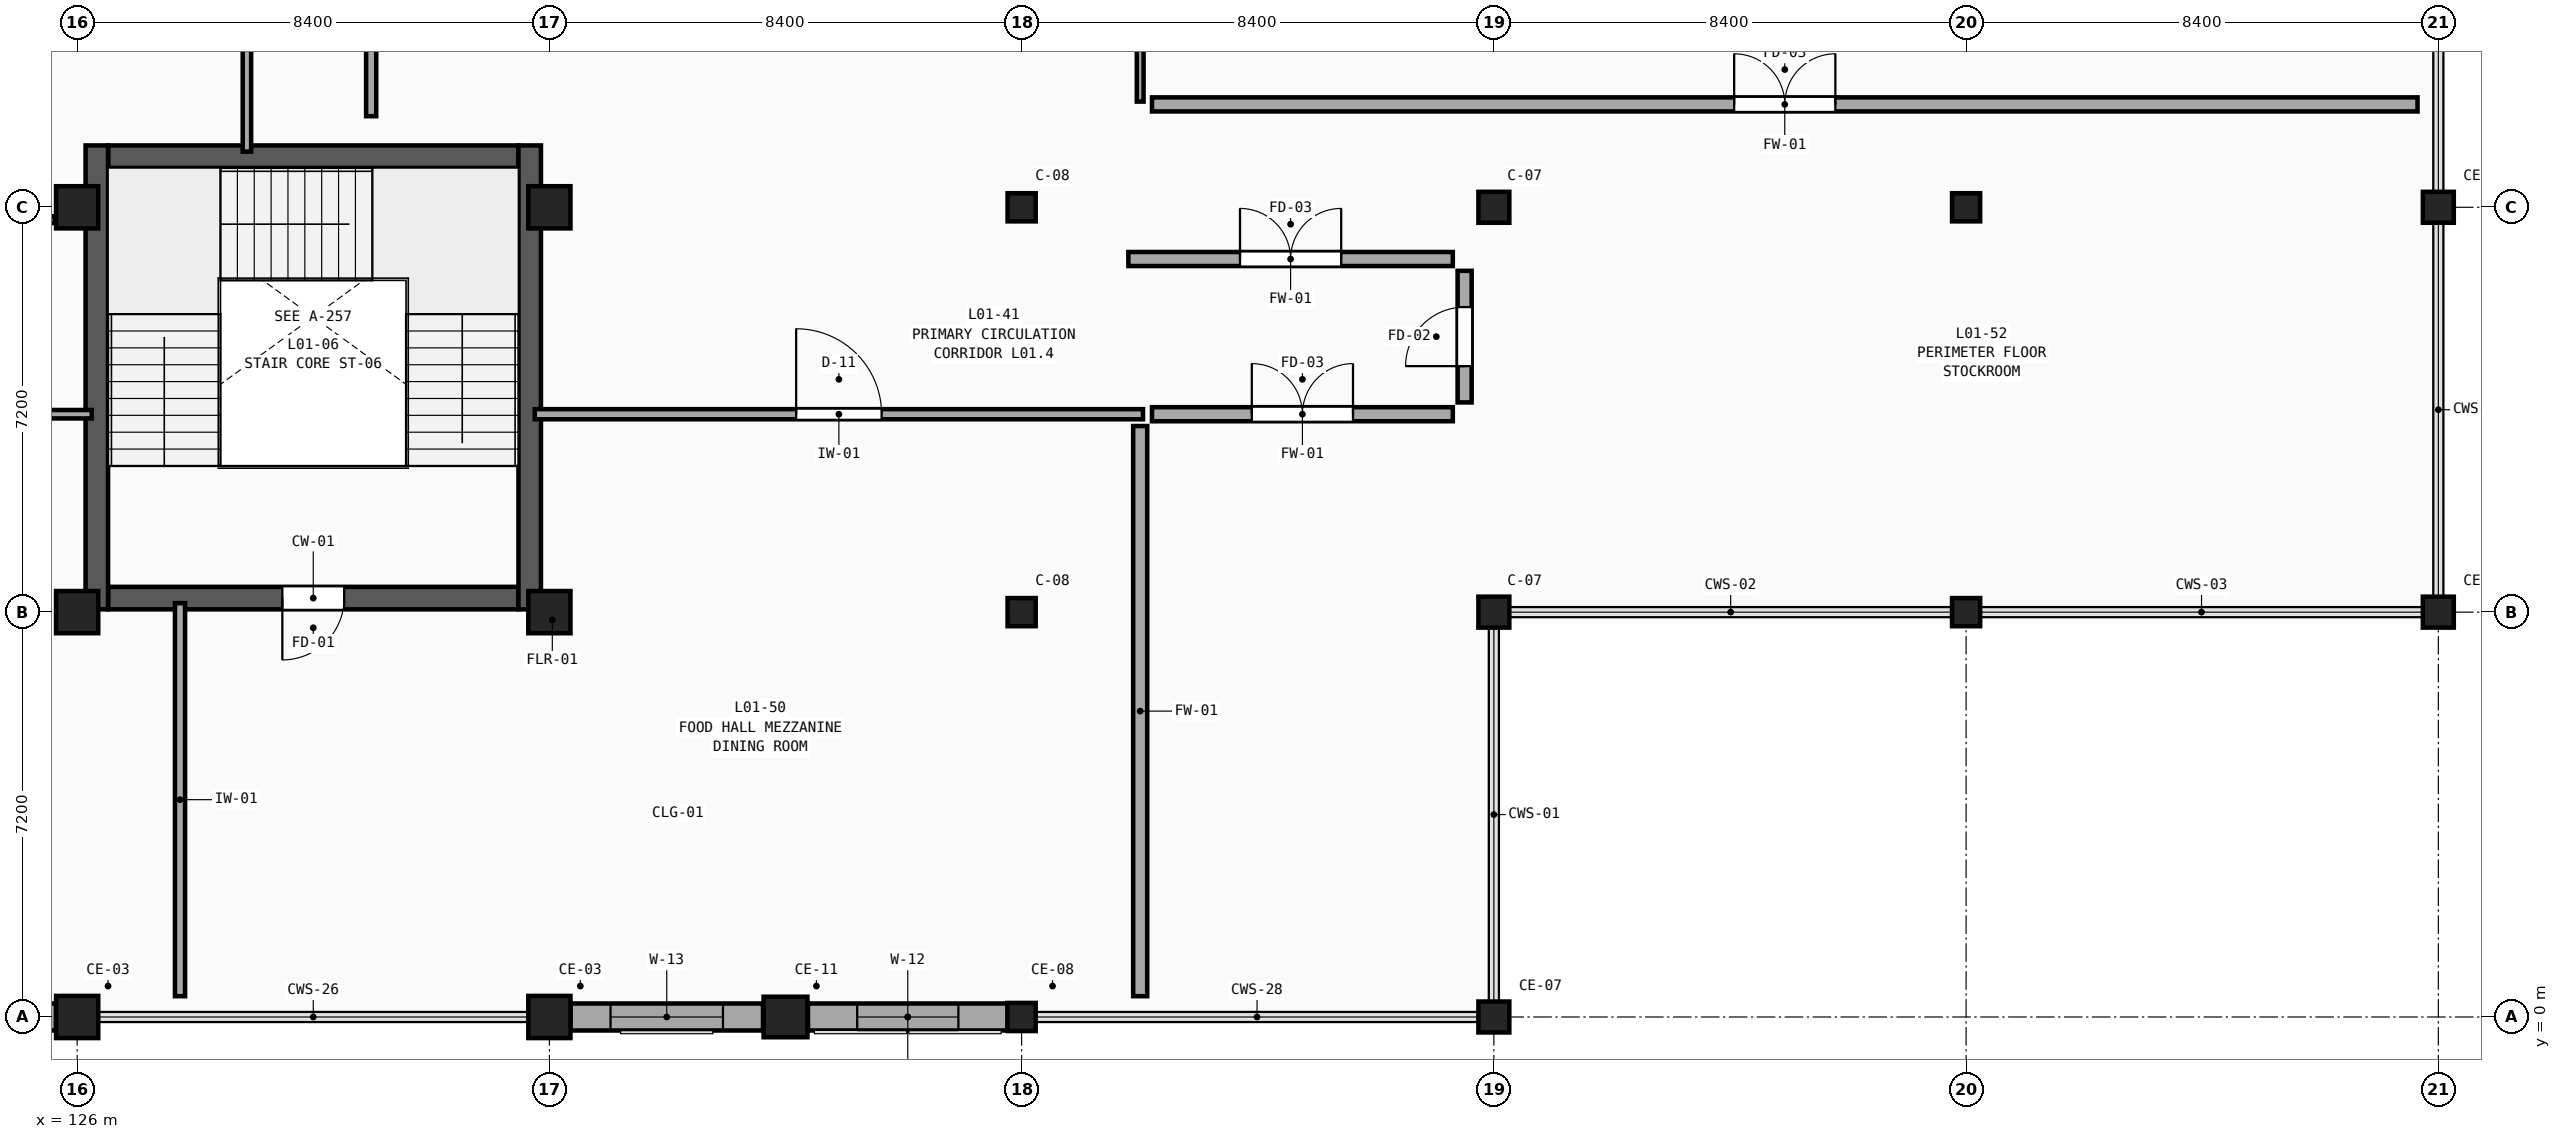
"""IFC4 building model, lengths in metres.
Left out: names, types, materials, properties, quantities, classifications, styles, units other than length and angle.
Written with IfcOpenShell. Run it as: python <this file> out.ifc"""

import sys

from ifc_helpers import new_model, si_unit, direction, frame, frame_2d, origin, origin_2d, place, context, subcontext, project, spatial, rectangle, extrude, element, fill, save


model = new_model("IFC4")
c1 = context("Model", 3, precision=1e-05, world=origin(), true_north=direction((0.0, 1.0)))
c2 = subcontext(c1, "Body", "Model", "MODEL_VIEW")
j1 = project(units=[si_unit("LENGTHUNIT", "METRE"), si_unit("PLANEANGLEUNIT", "RADIAN")], contexts=[c1])
p1 = place(None, origin())
s1 = spatial("IfcSite", under=j1, at=p1, CompositionType="ELEMENT")
p2 = place(p1, origin())
s2 = spatial("IfcBuilding", under=s1, at=p2, CompositionType="ELEMENT")
p3 = place(p2, frame((0.0, 0.0, 5.4)))
s3 = spatial("IfcBuildingStorey", under=s2, at=p3, CompositionType="ELEMENT", Elevation=5.4)
for number, where, z_axis, x_axis in (
    (1, (126.0, 0.0, 0.0), (0.0, 0.0, 1.0), (1.0, 0.0, 0.0)),
    (2, (126.0, 7.2, 0.0), (0.0, 0.0, 1.0), (1.0, 0.0, 0.0)),
    (3, (126.0, 14.4, 0.0), (0.0, 0.0, 1.0), (1.0, 0.0, 0.0)),
    (4, (134.4, 0.0, 0.0), (0.0, 0.0, 1.0), (1.0, 0.0, 0.0)),
    (5, (134.4, 7.2, 0.0), (0.0, 0.0, 1.0), (1.0, 0.0, 0.0)),
    (6, (134.4, 14.4, 0.0), (0.0, 0.0, 1.0), (1.0, 0.0, 0.0)),
):
    element("IfcColumn", number, at=place(p3, frame(where, z_axis=z_axis, x_axis=x_axis)), inside=s3, PredefinedType="COLUMN", context=c2, shape_type="SweptSolid", body=[
        extrude(rectangle(XDim=0.75, YDim=0.75, at=origin_2d()), origin(), (0.0, 0.0, 1.0), 4.5),
    ])
for number, where, z_axis, x_axis in (
    (7, (142.8, 0.0, 0.0), (0.0, 0.0, 1.0), (1.0, 0.0, 0.0)),
    (8, (142.8, 7.2, 0.0), (0.0, 0.0, 1.0), (1.0, 0.0, 0.0)),
    (9, (142.8, 14.4, 0.0), (0.0, 0.0, 1.0), (1.0, 0.0, 0.0)),
):
    element("IfcColumn", number, at=place(p3, frame(where, z_axis=z_axis, x_axis=x_axis)), inside=s3, PredefinedType="COLUMN", context=c2, shape_type="SweptSolid", body=[
        extrude(rectangle(XDim=0.5, YDim=0.5, at=origin_2d()), origin(), (0.0, 0.0, 1.0), 4.5),
    ])
for number, where, z_axis, x_axis in (
    (10, (151.2, 0.0, 0.0), (0.0, 0.0, 1.0), (1.0, 0.0, 0.0)),
    (11, (151.2, 7.2, 0.0), (0.0, 0.0, 1.0), (1.0, 0.0, 0.0)),
    (12, (151.2, 14.4, 0.0), (0.0, 0.0, 1.0), (1.0, 0.0, 0.0)),
):
    element("IfcColumn", number, at=place(p3, frame(where, z_axis=z_axis, x_axis=x_axis)), inside=s3, PredefinedType="COLUMN", context=c2, shape_type="SweptSolid", body=[
        extrude(rectangle(XDim=0.55, YDim=0.55, at=origin_2d()), origin(), (0.0, 0.0, 1.0), 4.5),
    ])
for number, where, z_axis, x_axis in (
    (13, (159.6, 7.2, 0.0), (0.0, 0.0, 1.0), (1.0, 0.0, 0.0)),
    (14, (159.6, 14.4, 0.0), (0.0, 0.0, 1.0), (1.0, 0.0, 0.0)),
):
    element("IfcColumn", number, at=place(p3, frame(where, z_axis=z_axis, x_axis=x_axis)), inside=s3, PredefinedType="COLUMN", context=c2, shape_type="SweptSolid", body=[
        extrude(rectangle(XDim=0.5, YDim=0.5, at=origin_2d()), origin(), (0.0, 0.0, 1.0), 4.5),
    ])
for number, where, z_axis, x_axis in (
    (15, (168.0, 7.2, 0.0), (0.0, 0.0, 1.0), (1.0, 0.0, 0.0)),
    (16, (168.0, 14.4, 0.0), (0.0, 0.0, 1.0), (1.0, 0.0, 0.0)),
):
    element("IfcColumn", number, at=place(p3, frame(where, z_axis=z_axis, x_axis=x_axis)), inside=s3, PredefinedType="COLUMN", context=c2, shape_type="SweptSolid", body=[
        extrude(rectangle(XDim=0.55, YDim=0.55, at=origin_2d()), origin(), (0.0, 0.0, 1.0), 4.5),
    ])
p4 = place(p3, frame((138.6, 0.0, 0.0), z_axis=(0.0, 0.0, 1.0), x_axis=(1.0, 0.0, 0.0)))
e17 = element("IfcColumn", 17, at=p4, inside=s3, PredefinedType="PILASTER", context=c2, shape_type="SweptSolid", body=[
    extrude(rectangle(XDim=0.78, YDim=0.72, at=origin_2d()), origin(), (0.0, 0.0, 1.0), 4.5),
])
p5 = place(p3, frame((125.625, 0.0, 0.0), z_axis=(0.0, 0.0, 1.0), x_axis=(-1.0, 0.0, 0.0)))
e18 = element("IfcWall", 18, at=p5, inside=s3, PredefinedType="SOLIDWALL", context=c2, shape_type="SweptSolid", body=[
    extrude(rectangle(XDim=3.425, YDim=0.48, at=frame_2d((1.712, 0.0))), origin(), (0.0, 0.0, 1.0), 3.63),
])
p6 = place(p5, frame((0.427, 0.0, 0.75)))
e19 = element("IfcOpeningElement", 19, at=p6, cuts=e18, PredefinedType="OPENING", context=c2, shape_type="SweptSolid", body=[
    extrude(rectangle(XDim=2.57, YDim=1.9, at=frame_2d((1.285, 0.95))), frame((0.0, 0.26, 0.0), z_axis=(0.0, -1.0, 0.0), x_axis=(1.0, 0.0, 0.0)), (0.0, 0.0, 1.0), 0.52),
])
p7 = place(p3, frame((142.55, 0.0, 0.0), z_axis=(0.0, 0.0, 1.0), x_axis=(-1.0, 0.0, 0.0)))
e20 = element("IfcWall", 20, at=p7, inside=s3, PredefinedType="SOLIDWALL", context=c2, shape_type="SweptSolid", body=[
    extrude(rectangle(XDim=3.55, YDim=0.48, at=frame_2d((1.775, 0.0))), origin(), (0.0, 0.0, 1.0), 3.63),
])
p8 = place(p7, frame((0.875, 0.0, 0.75)))
e21 = element("IfcOpeningElement", 21, at=p8, cuts=e20, PredefinedType="OPENING", context=c2, shape_type="SweptSolid", body=[
    extrude(rectangle(XDim=1.8, YDim=2.08, at=frame_2d((0.9, 1.04))), frame((0.0, 0.26, 0.0), z_axis=(0.0, -1.0, 0.0), x_axis=(1.0, 0.0, 0.0)), (0.0, 0.0, 1.0), 0.52),
])
p9 = place(p3, frame((138.2, 0.0, 0.0), z_axis=(0.0, 0.0, 1.0), x_axis=(-1.0, 0.0, 0.0)))
e22 = element("IfcWall", 22, at=p9, inside=s3, PredefinedType="SOLIDWALL", context=c2, shape_type="SweptSolid", body=[
    extrude(rectangle(XDim=3.425, YDim=0.48, at=frame_2d((1.712, 0.0))), origin(), (0.0, 0.0, 1.0), 3.63),
])
p10 = place(p9, frame((0.712, 0.0, 0.75)))
e23 = element("IfcOpeningElement", 23, at=p10, cuts=e22, PredefinedType="OPENING", context=c2, shape_type="SweptSolid", body=[
    extrude(rectangle(XDim=2.0, YDim=2.08, at=frame_2d((1.0, 1.04))), frame((0.0, 0.26, 0.0), z_axis=(0.0, -1.0, 0.0), x_axis=(1.0, 0.0, 0.0)), (0.0, 0.0, 1.0), 0.52),
])
p11 = place(p3, frame((133.85, 7.45, 0.0), z_axis=(0.0, 0.0, 1.0), x_axis=(-1.0, 0.0, 0.0)))
e24 = element("IfcWall", 24, at=p11, inside=s3, PredefinedType="SHEAR", context=c2, shape_type="SweptSolid", body=[
    extrude(rectangle(XDim=7.3, YDim=0.4, at=frame_2d((3.65, 0.0))), origin(), (0.0, 0.0, 1.0), 4.5),
])
p12 = place(p11, frame((3.1, 0.0, 0.0)))
e25 = element("IfcOpeningElement", 25, at=p12, cuts=e24, PredefinedType="OPENING", context=c2, shape_type="SweptSolid", body=[
    extrude(rectangle(XDim=1.1, YDim=2.2, at=frame_2d((0.55, 1.1))), frame((0.0, 0.22, 0.0), z_axis=(0.0, -1.0, 0.0), x_axis=(1.0, 0.0, 0.0)), (0.0, 0.0, 1.0), 0.44),
])
p13 = place(p3, frame((126.55, 15.3, 0.0), z_axis=(0.0, 0.0, 1.0), x_axis=(1.0, 0.0, 0.0)))
e26 = element("IfcWall", 26, at=p13, inside=s3, PredefinedType="SHEAR", context=c2, shape_type="SweptSolid", body=[
    extrude(rectangle(XDim=7.3, YDim=0.4, at=frame_2d((3.65, 0.0))), origin(), (0.0, 0.0, 1.0), 4.5),
])
for number, where, z_axis, x_axis in (
    (27, (126.35, 15.5, 0.0), (0.0, 0.0, 1.0), (0.0, -1.0, 0.0)),
    (28, (134.05, 7.25, 0.0), (0.0, 0.0, 1.0), (0.0, 1.0, 0.0)),
):
    element("IfcWall", number, at=place(p3, frame(where, z_axis=z_axis, x_axis=x_axis)), inside=s3, PredefinedType="SHEAR", context=c2, shape_type="SweptSolid", body=[
        extrude(rectangle(XDim=8.25, YDim=0.4, at=frame_2d((4.125, 0.0))), origin(), (0.0, 0.0, 1.0), 4.5),
    ])
p14 = place(p3, frame((108.74, 10.72, 0.0), z_axis=(0.0, 0.0, 1.0), x_axis=(1.0, 0.0, 0.0)))
e29 = element("IfcWall", 29, at=p14, inside=s3, PredefinedType="PARTITIONING", context=c2, shape_type="SweptSolid", body=[
    extrude(rectangle(XDim=17.52, YDim=0.15, at=frame_2d((8.76, 0.0))), origin(), (0.0, 0.0, 1.0), 4.18),
])
p15 = place(p14, frame((8.16, 0.0, 0.0)))
e30 = element("IfcOpeningElement", 30, at=p15, cuts=e29, PredefinedType="OPENING", context=c2, shape_type="SweptSolid", body=[
    extrude(rectangle(XDim=1.2, YDim=2.45, at=frame_2d((0.6, 1.225))), frame((0.0, 0.095, 0.0), z_axis=(0.0, -1.0, 0.0), x_axis=(1.0, 0.0, 0.0)), (0.0, 0.0, 1.0), 0.19),
])
p16 = place(p3, frame((117.995, 14.18, 0.0), z_axis=(0.0, 0.0, 1.0), x_axis=(1.0, 0.0, 0.0)))
e31 = element("IfcWall", 31, at=p16, inside=s3, PredefinedType="PARTITIONING", context=c2, shape_type="SweptSolid", body=[
    extrude(rectangle(XDim=7.61, YDim=0.12, at=frame_2d((3.805, 0.0))), origin(), (0.0, 0.0, 1.0), 3.73),
])
p17 = place(p16, frame((3.365, 0.0, 0.0)))
e32 = element("IfcOpeningElement", 32, at=p17, cuts=e31, PredefinedType="OPENING", context=c2, shape_type="SweptSolid", body=[
    extrude(rectangle(XDim=0.88, YDim=2.05, at=frame_2d((0.44, 1.025))), frame((0.0, 0.08, 0.0), z_axis=(0.0, -1.0, 0.0), x_axis=(1.0, 0.0, 0.0)), (0.0, 0.0, 1.0), 0.16),
])
p18 = place(p3, frame((134.14, 10.72, 0.0), z_axis=(0.0, 0.0, 1.0), x_axis=(1.0, 0.0, 0.0)))
e33 = element("IfcWall", 33, at=p18, inside=s3, PredefinedType="PARTITIONING", context=c2, shape_type="SweptSolid", body=[
    extrude(rectangle(XDim=10.819, YDim=0.18, at=frame_2d((5.41, 0.0))), origin(), (0.0, 0.0, 1.0), 4.18),
])
p19 = place(p18, frame((4.649, 0.0, 0.0)))
e34 = element("IfcOpeningElement", 34, at=p19, cuts=e33, PredefinedType="OPENING", context=c2, shape_type="SweptSolid", body=[
    extrude(rectangle(XDim=1.52, YDim=2.13, at=frame_2d((0.76, 1.065))), frame((0.0, 0.11, 0.0), z_axis=(0.0, -1.0, 0.0), x_axis=(1.0, 0.0, 0.0)), (0.0, 0.0, 1.0), 0.22),
])
p20 = place(p3, frame((129.02, 15.39, 0.0), z_axis=(0.0, 0.0, 1.0), x_axis=(0.0, 1.0, 0.0)))
e35 = element("IfcWall", 35, at=p20, inside=s3, PredefinedType="PARTITIONING", context=c2, shape_type="SweptSolid", body=[
    extrude(rectangle(XDim=9.47, YDim=0.15, at=frame_2d((4.735, 0.0))), origin(), (0.0, 0.0, 1.0), 4.18),
])
p21 = place(p20, frame((3.895, 0.0, 0.0)))
e36 = element("IfcOpeningElement", 36, at=p21, cuts=e35, PredefinedType="OPENING", context=c2, shape_type="SweptSolid", body=[
    extrude(rectangle(XDim=1.68, YDim=2.29, at=frame_2d((0.84, 1.145))), frame((0.0, 0.095, 0.0), z_axis=(0.0, -1.0, 0.0), x_axis=(1.0, 0.0, 0.0)), (0.0, 0.0, 1.0), 0.19),
])
p22 = place(p3, frame((131.23, 16.02, 0.0), z_axis=(0.0, 0.0, 1.0), x_axis=(0.0, 1.0, 0.0)))
e37 = element("IfcWall", 37, at=p22, inside=s3, PredefinedType="PARTITIONING", context=c2, shape_type="SweptSolid", body=[
    extrude(rectangle(XDim=9.0, YDim=0.18, at=frame_2d((4.5, 0.0))), origin(), (0.0, 0.0, 1.0), 4.18),
])
p23 = place(p22, frame((3.98, 0.0, 0.0)))
e38 = element("IfcOpeningElement", 38, at=p23, cuts=e37, PredefinedType="OPENING", context=c2, shape_type="SweptSolid", body=[
    extrude(rectangle(XDim=1.04, YDim=2.37, at=frame_2d((0.52, 1.185))), frame((0.0, 0.11, 0.0), z_axis=(0.0, -1.0, 0.0), x_axis=(1.0, 0.0, 0.0)), (0.0, 0.0, 1.0), 0.22),
])
p24 = place(p3, frame((144.699, 13.48, 0.0), z_axis=(0.0, 0.0, 1.0), x_axis=(1.0, 0.0, 0.0)))
e39 = element("IfcWall", 39, at=p24, inside=s3, PredefinedType="SOLIDWALL", context=c2, shape_type="SweptSolid", body=[
    extrude(rectangle(XDim=5.771, YDim=0.25, at=frame_2d((2.885, 0.0))), origin(), (0.0, 0.0, 1.0), 4.18),
])
p25 = place(p24, frame((1.986, 0.0, 0.0)))
e40 = element("IfcOpeningElement", 40, at=p25, cuts=e39, PredefinedType="OPENING", context=c2, shape_type="SweptSolid", body=[
    extrude(rectangle(XDim=1.8, YDim=2.3, at=frame_2d((0.9, 1.15))), frame((0.0, 0.145, 0.0), z_axis=(0.0, -1.0, 0.0), x_axis=(1.0, 0.0, 0.0)), (0.0, 0.0, 1.0), 0.29),
])
p26 = place(p3, frame((145.119, 10.72, 0.0), z_axis=(0.0, 0.0, 1.0), x_axis=(1.0, 0.0, 0.0)))
e41 = element("IfcWall", 41, at=p26, inside=s3, PredefinedType="SOLIDWALL", context=c2, shape_type="SweptSolid", body=[
    extrude(rectangle(XDim=5.351, YDim=0.25, at=frame_2d((2.676, 0.0))), origin(), (0.0, 0.0, 1.0), 4.18),
])
p27 = place(p26, frame((1.775, 0.0, 0.0)))
e42 = element("IfcOpeningElement", 42, at=p27, cuts=e41, PredefinedType="OPENING", context=c2, shape_type="SweptSolid", body=[
    extrude(rectangle(XDim=1.8, YDim=2.3, at=frame_2d((0.9, 1.15))), frame((0.0, 0.145, 0.0), z_axis=(0.0, -1.0, 0.0), x_axis=(1.0, 0.0, 0.0)), (0.0, 0.0, 1.0), 0.29),
])
p28 = place(p3, frame((150.68, 10.93, 0.0), z_axis=(0.0, 0.0, 1.0), x_axis=(0.0, 1.0, 0.0)))
e43 = element("IfcWall", 43, at=p28, inside=s3, PredefinedType="SOLIDWALL", context=c2, shape_type="SweptSolid", body=[
    extrude(rectangle(XDim=2.34, YDim=0.25, at=frame_2d((1.17, 0.0))), origin(), (0.0, 0.0, 1.0), 3.73),
])
p29 = place(p28, frame((0.645, 0.0, 0.0)))
e44 = element("IfcOpeningElement", 44, at=p29, cuts=e43, PredefinedType="OPENING", context=c2, shape_type="SweptSolid", body=[
    extrude(rectangle(XDim=1.05, YDim=2.15, at=frame_2d((0.525, 1.075))), frame((0.0, 0.145, 0.0), z_axis=(0.0, -1.0, 0.0), x_axis=(1.0, 0.0, 0.0)), (0.0, 0.0, 1.0), 0.29),
])
p30 = place(p3, frame((145.119, 16.23, 0.0), z_axis=(0.0, 0.0, 1.0), x_axis=(1.0, 0.0, 0.0)))
e45 = element("IfcWall", 45, at=p30, inside=s3, PredefinedType="SOLIDWALL", context=c2, shape_type="SweptSolid", body=[
    extrude(rectangle(XDim=22.511, YDim=0.25, at=frame_2d((11.255, 0.0))), origin(), (0.0, 0.0, 1.0), 4.18),
])
p31 = place(p30, frame((10.355, 0.0, 0.0)))
e46 = element("IfcOpeningElement", 46, at=p31, cuts=e45, PredefinedType="OPENING", context=c2, shape_type="SweptSolid", body=[
    extrude(rectangle(XDim=1.8, YDim=2.3, at=frame_2d((0.9, 1.15))), frame((0.0, 0.145, 0.0), z_axis=(0.0, -1.0, 0.0), x_axis=(1.0, 0.0, 0.0)), (0.0, 0.0, 1.0), 0.29),
])
p32 = place(p3, frame((144.909, 0.37, 0.0), z_axis=(0.0, 0.0, 1.0), x_axis=(0.0, 1.0, 0.0)))
e47 = element("IfcWall", 47, at=p32, inside=s3, PredefinedType="SOLIDWALL", context=c2, shape_type="SweptSolid", body=[
    extrude(rectangle(XDim=10.14, YDim=0.25, at=frame_2d((5.07, 0.0))), origin(), (0.0, 0.0, 1.0), 4.18),
])
p33 = place(p3, frame((127.83, 0.37, 0.0), z_axis=(0.0, 0.0, 1.0), x_axis=(0.0, 1.0, 0.0)))
e48 = element("IfcWall", 48, at=p33, inside=s3, PredefinedType="PARTITIONING", context=c2, shape_type="SweptSolid", body=[
    extrude(rectangle(XDim=6.99, YDim=0.18, at=frame_2d((3.495, 0.0))), origin(), (0.0, 0.0, 1.0), 4.18),
])
p34 = place(p3, frame((144.909, 16.28, 0.0), z_axis=(0.0, 0.0, 1.0), x_axis=(0.0, 1.0, 0.0)))
e49 = element("IfcWall", 49, at=p34, inside=s3, PredefinedType="PARTITIONING", context=c2, shape_type="SweptSolid", body=[
    extrude(rectangle(XDim=4.95, YDim=0.12, at=frame_2d((2.475, 0.0))), origin(), (0.0, 0.0, 1.0), 4.18),
])
p35 = place(p8, origin())
e50 = element("IfcWindow", 50, at=p35, inside=s3, PartitioningType="DOUBLE_PANEL_VERTICAL", PredefinedType="WINDOW", context=c2, shape_type="SweptSolid", body=[
    extrude(rectangle(XDim=1.8, YDim=2.08, at=frame_2d((0.9, 1.04))), frame((0.0, 0.03, 0.0), z_axis=(0.0, -1.0, 0.0), x_axis=(1.0, 0.0, 0.0)), (0.0, 0.0, 1.0), 0.06),
])
fill(e21, e50)
p36 = place(p10, origin())
e51 = element("IfcWindow", 51, at=p36, inside=s3, PartitioningType="TRIPLE_PANEL_VERTICAL", PredefinedType="WINDOW", context=c2, shape_type="SweptSolid", body=[
    extrude(rectangle(XDim=2.0, YDim=2.08, at=frame_2d((1.0, 1.04))), frame((0.0, 0.03, 0.0), z_axis=(0.0, -1.0, 0.0), x_axis=(1.0, 0.0, 0.0)), (0.0, 0.0, 1.0), 0.06),
])
fill(e23, e51)
p37 = place(p12, origin())
e52 = element("IfcDoor", 52, at=p37, inside=s3, OperationType="SINGLE_SWING_RIGHT", PredefinedType="DOOR", context=c2, shape_type="SweptSolid", body=[
    extrude(rectangle(XDim=1.1, YDim=2.2, at=frame_2d((0.55, 1.1))), frame((0.0, 0.025, 0.0), z_axis=(0.0, -1.0, 0.0), x_axis=(1.0, 0.0, 0.0)), (0.0, 0.0, 1.0), 0.05),
])
fill(e25, e52)
p38 = place(p19, origin())
e53 = element("IfcDoor", 53, at=p38, inside=s3, OperationType="SINGLE_SWING_LEFT", PredefinedType="DOOR", context=c2, shape_type="SweptSolid", body=[
    extrude(rectangle(XDim=1.52, YDim=2.13, at=frame_2d((0.76, 1.065))), frame((0.0, 0.025, 0.0), z_axis=(0.0, -1.0, 0.0), x_axis=(1.0, 0.0, 0.0)), (0.0, 0.0, 1.0), 0.05),
])
fill(e34, e53)
p39 = place(p25, origin())
e54 = element("IfcDoor", 54, at=p39, inside=s3, OperationType="DOUBLE_DOOR_SINGLE_SWING", PredefinedType="DOOR", context=c2, shape_type="SweptSolid", body=[
    extrude(rectangle(XDim=1.8, YDim=2.3, at=frame_2d((0.9, 1.15))), frame((0.0, 0.025, 0.0), z_axis=(0.0, -1.0, 0.0), x_axis=(1.0, 0.0, 0.0)), (0.0, 0.0, 1.0), 0.05),
])
fill(e40, e54)
p40 = place(p27, origin())
e55 = element("IfcDoor", 55, at=p40, inside=s3, OperationType="DOUBLE_DOOR_SINGLE_SWING", PredefinedType="DOOR", context=c2, shape_type="SweptSolid", body=[
    extrude(rectangle(XDim=1.8, YDim=2.3, at=frame_2d((0.9, 1.15))), frame((0.0, 0.025, 0.0), z_axis=(0.0, -1.0, 0.0), x_axis=(1.0, 0.0, 0.0)), (0.0, 0.0, 1.0), 0.05),
])
fill(e42, e55)
p41 = place(p29, origin())
e56 = element("IfcDoor", 56, at=p41, inside=s3, OperationType="SINGLE_SWING_LEFT", PredefinedType="DOOR", context=c2, shape_type="SweptSolid", body=[
    extrude(rectangle(XDim=1.05, YDim=2.15, at=frame_2d((0.525, 1.075))), frame((0.0, 0.025, 0.0), z_axis=(0.0, -1.0, 0.0), x_axis=(1.0, 0.0, 0.0)), (0.0, 0.0, 1.0), 0.05),
])
fill(e44, e56)
p42 = place(p31, origin())
e57 = element("IfcDoor", 57, at=p42, inside=s3, OperationType="DOUBLE_DOOR_SINGLE_SWING", PredefinedType="DOOR", context=c2, shape_type="SweptSolid", body=[
    extrude(rectangle(XDim=1.8, YDim=2.3, at=frame_2d((0.9, 1.15))), frame((0.0, 0.025, 0.0), z_axis=(0.0, -1.0, 0.0), x_axis=(1.0, 0.0, 0.0)), (0.0, 0.0, 1.0), 0.05),
])
fill(e46, e57)
save(model, sys.argv[1])
